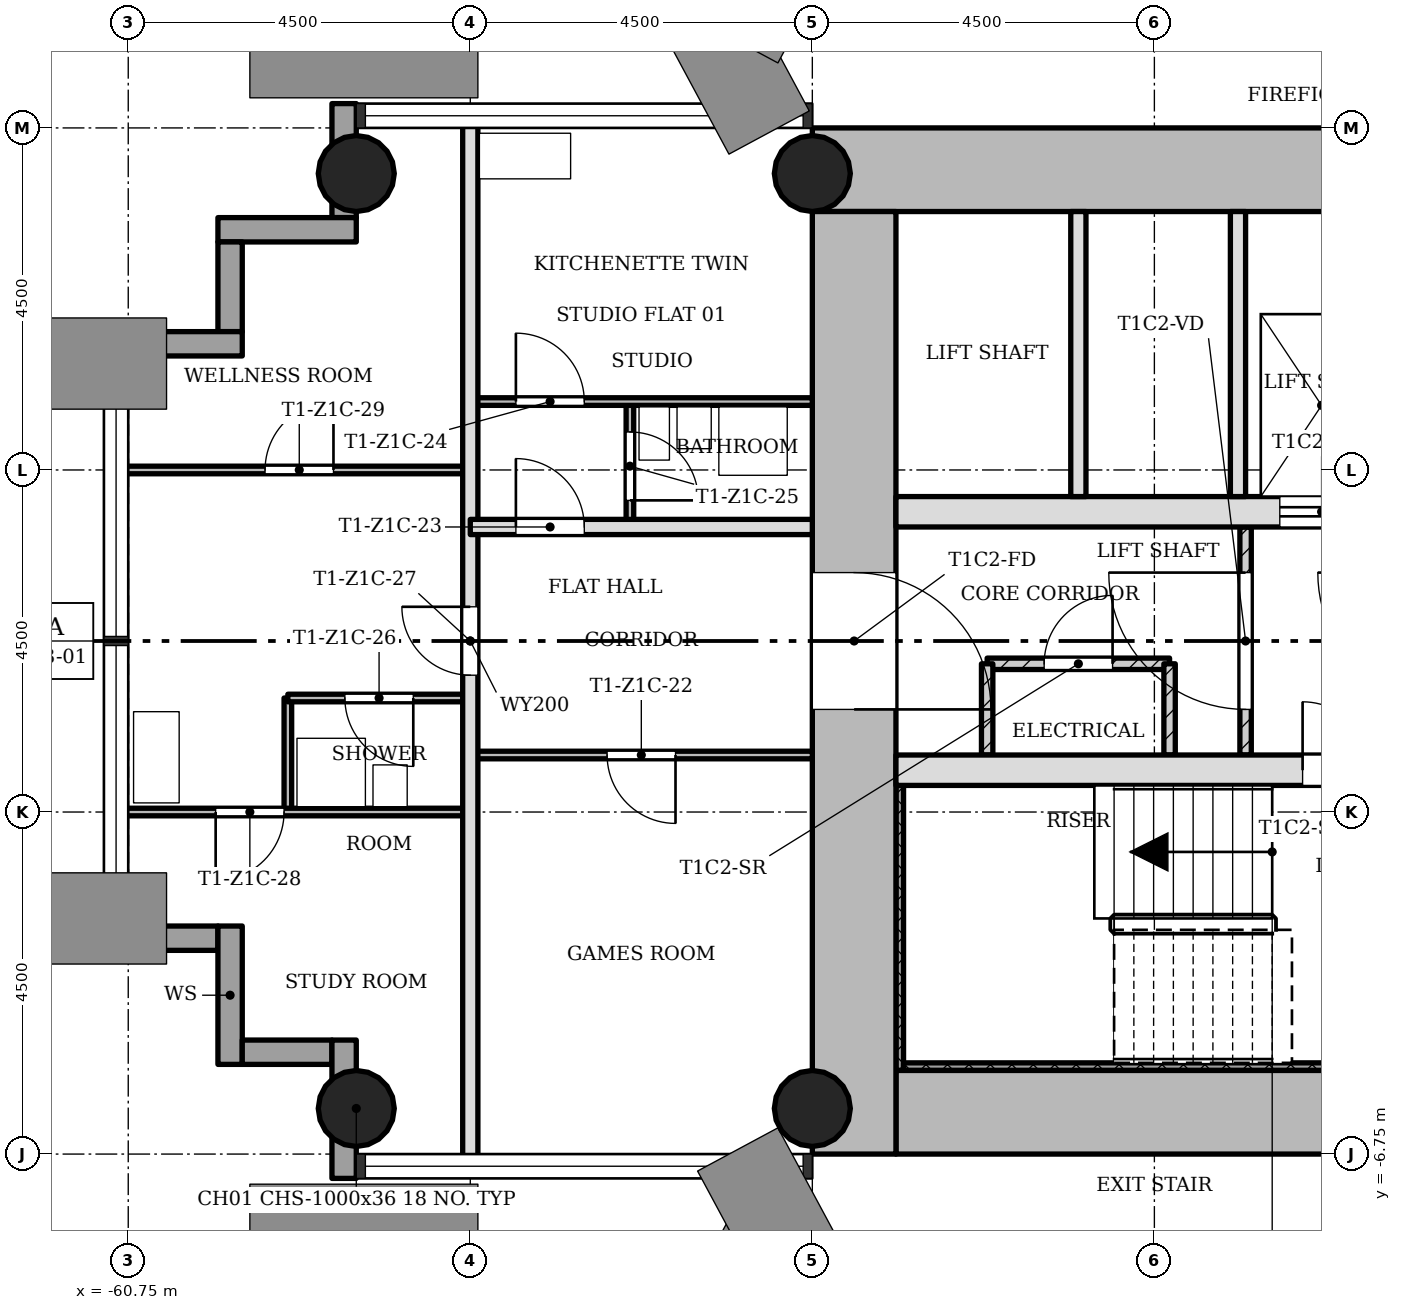
"""IFC4 building model, lengths in metres.
Left out: names, types, materials, properties, quantities, classifications, styles, units other than length and angle.
Written with IfcOpenShell. Run it as: python <this file> out.ifc"""

import sys

from ifc_helpers import new_model, si_unit, direction, frame, frame_2d, origin, origin_2d, place, context, subcontext, project, spatial, rectangle, hollow_circle, extrude, element, fill, save


model = new_model("IFC4")
c1 = context("Model", 3, precision=1e-05, world=origin(), true_north=direction((0.0, 1.0)))
c2 = subcontext(c1, "Body", "Model", "MODEL_VIEW")
j1 = project(units=[si_unit("LENGTHUNIT", "METRE"), si_unit("PLANEANGLEUNIT", "RADIAN")], contexts=[c1])
p1 = place(None, origin())
s1 = spatial("IfcSite", under=j1, at=p1, CompositionType="ELEMENT")
p2 = place(p1, origin())
s2 = spatial("IfcBuilding", under=s1, at=p2, CompositionType="ELEMENT")
p3 = place(p2, frame((0.0, 0.0, 51.7)))
s3 = spatial("IfcBuildingStorey", under=s2, at=p3, CompositionType="ELEMENT", Elevation=51.7)
p4 = place(p3, frame((-50.65, -6.2, 0.0), z_axis=(0.0, 0.0, 1.0), x_axis=(1.0, 0.0, 0.0)))
e1 = element("IfcWall", 1, at=p4, inside=s3, PredefinedType="SHEAR", context=c2, shape_type="SweptSolid", body=[
    extrude(rectangle(XDim=7.998, YDim=1.1, at=frame_2d((3.999, 0.0))), origin(), (0.0, 0.0, 1.0), 3.4),
])
p5 = place(p3, frame((-43.85, 6.2, 0.0), z_axis=(0.0, 0.0, 1.0), x_axis=(-1.0, 0.0, 0.0)))
e2 = element("IfcWall", 2, at=p5, inside=s3, PredefinedType="SHEAR", context=c2, shape_type="SweptSolid", body=[
    extrude(rectangle(XDim=7.9, YDim=1.1, at=frame_2d((3.95, 0.0))), origin(), (0.0, 0.0, 1.0), 3.4),
])
p6 = place(p3, frame((-51.2, 5.65, 0.0), z_axis=(0.0, 0.0, 1.0), x_axis=(0.0, -1.0, 0.0)))
e3 = element("IfcWall", 3, at=p6, inside=s3, PredefinedType="SHEAR", context=c2, shape_type="SweptSolid", body=[
    extrude(rectangle(XDim=12.4, YDim=1.1, at=frame_2d((6.2, 0.0))), origin(), (0.0, 0.0, 1.0), 3.4),
])
p7 = place(p6, frame((4.75, 0.0, 0.0)))
e4 = element("IfcOpeningElement", 4, at=p7, cuts=e3, PredefinedType="OPENING", context=c2, shape_type="SweptSolid", body=[
    extrude(rectangle(XDim=1.8, YDim=2.1, at=frame_2d((0.9, 1.05))), frame((0.0, 0.56, 0.0), z_axis=(0.0, -1.0, 0.0), x_axis=(1.0, 0.0, 0.0)), (0.0, 0.0, 1.0), 1.12),
])
p8 = place(p3, frame((-50.65, -1.7, 0.0), z_axis=(0.0, 0.0, 1.0), x_axis=(1.0, 0.0, 0.0)))
e5 = element("IfcWall", 5, at=p8, inside=s3, PredefinedType="SHEAR", context=c2, shape_type="SweptSolid", body=[
    extrude(rectangle(XDim=6.8, YDim=0.4, at=frame_2d((3.4, 0.0))), origin(), (0.0, 0.0, 1.0), 3.4),
])
p9 = place(p8, frame((5.35, 0.0, 0.0)))
e6 = element("IfcOpeningElement", 6, at=p9, cuts=e5, PredefinedType="OPENING", context=c2, shape_type="SweptSolid", body=[
    extrude(rectangle(XDim=0.9, YDim=2.1, at=frame_2d((0.45, 1.05))), frame((0.0, 0.21, 0.0), z_axis=(0.0, -1.0, 0.0), x_axis=(1.0, 0.0, 0.0)), (0.0, 0.0, 1.0), 0.42),
])
p10 = place(p3, frame((-50.65, 1.7, 0.0), z_axis=(0.0, 0.0, 1.0), x_axis=(1.0, 0.0, 0.0)))
e7 = element("IfcWall", 7, at=p10, inside=s3, PredefinedType="SHEAR", context=c2, shape_type="SweptSolid", body=[
    extrude(rectangle(XDim=6.8, YDim=0.4, at=frame_2d((3.4, 0.0))), origin(), (0.0, 0.0, 1.0), 3.4),
])
p11 = place(p10, frame((5.05, 0.0, 0.0)))
e8 = element("IfcOpeningElement", 8, at=p11, cuts=e7, PredefinedType="OPENING", context=c2, shape_type="SweptSolid", body=[
    extrude(rectangle(XDim=1.1, YDim=2.1, at=frame_2d((0.55, 1.05))), frame((0.0, 0.21, 0.0), z_axis=(0.0, -1.0, 0.0), x_axis=(1.0, 0.0, 0.0)), (0.0, 0.0, 1.0), 0.42),
])
for number, where, z_axis, x_axis in (
    (9, (-51.75, -6.15, 0.0), (0.0, 0.0, 1.0), (1.0, 0.0, 0.0)),
    (10, (-51.75, 6.15, 0.0), (0.0, 0.0, 1.0), (1.0, 0.0, 0.0)),
    (11, (-57.75, -6.15, 0.0), (0.0, 0.0, 1.0), (1.0, 0.0, 0.0)),
    (12, (-57.75, 6.15, 0.0), (0.0, 0.0, 1.0), (1.0, 0.0, 0.0)),
):
    element("IfcColumn", number, at=place(p3, frame(where, z_axis=z_axis, x_axis=x_axis)), inside=s3, PredefinedType="COLUMN", context=c2, shape_type="SweptSolid", body=[
        extrude(hollow_circle(Radius=0.5, WallThickness=0.036, at=origin_2d()), origin(), (0.0, 0.0, 1.0), 3.4),
    ])
p12 = place(p3, frame((-61.07, -3.91, -0.3), z_axis=(0.0, 0.0, 1.0), x_axis=(1.0, 0.0, 0.0)))
e13 = element("IfcWall", 13, at=p12, inside=s3, PredefinedType="STANDARD", context=c2, shape_type="SweptSolid", body=[
    extrude(rectangle(XDim=1.5, YDim=0.32, at=frame_2d((0.75, 0.0))), origin(), (0.0, 0.0, 1.0), 3.4),
])
p13 = place(p3, frame((-59.41, -3.75, -0.3), z_axis=(0.0, 0.0, 1.0), x_axis=(0.0, -1.0, 0.0)))
e14 = element("IfcWall", 14, at=p13, inside=s3, PredefinedType="STANDARD", context=c2, shape_type="SweptSolid", body=[
    extrude(rectangle(XDim=1.82, YDim=0.32, at=frame_2d((0.91, 0.0))), origin(), (0.0, 0.0, 1.0), 3.4),
])
p14 = place(p3, frame((-59.25, -5.41, -0.3), z_axis=(0.0, 0.0, 1.0), x_axis=(1.0, 0.0, 0.0)))
e15 = element("IfcWall", 15, at=p14, inside=s3, PredefinedType="STANDARD", context=c2, shape_type="SweptSolid", body=[
    extrude(rectangle(XDim=1.18, YDim=0.32, at=frame_2d((0.59, 0.0))), origin(), (0.0, 0.0, 1.0), 3.4),
])
p15 = place(p3, frame((-57.91, -5.25, -0.3), z_axis=(0.0, 0.0, 1.0), x_axis=(0.0, -1.0, 0.0)))
e16 = element("IfcWall", 16, at=p15, inside=s3, PredefinedType="STANDARD", context=c2, shape_type="SweptSolid", body=[
    extrude(rectangle(XDim=1.82, YDim=0.32, at=frame_2d((0.91, 0.0))), origin(), (0.0, 0.0, 1.0), 3.4),
])
p16 = place(p3, frame((-57.91, 7.07, -0.3), z_axis=(0.0, 0.0, 1.0), x_axis=(0.0, -1.0, 0.0)))
e17 = element("IfcWall", 17, at=p16, inside=s3, PredefinedType="STANDARD", context=c2, shape_type="SweptSolid", body=[
    extrude(rectangle(XDim=1.5, YDim=0.32, at=frame_2d((0.75, 0.0))), origin(), (0.0, 0.0, 1.0), 3.4),
])
p17 = place(p3, frame((-57.75, 5.41, -0.3), z_axis=(0.0, 0.0, 1.0), x_axis=(-1.0, 0.0, 0.0)))
e18 = element("IfcWall", 18, at=p17, inside=s3, PredefinedType="STANDARD", context=c2, shape_type="SweptSolid", body=[
    extrude(rectangle(XDim=1.82, YDim=0.32, at=frame_2d((0.91, 0.0))), origin(), (0.0, 0.0, 1.0), 3.4),
])
p18 = place(p3, frame((-59.41, 5.25, -0.3), z_axis=(0.0, 0.0, 1.0), x_axis=(0.0, -1.0, 0.0)))
e19 = element("IfcWall", 19, at=p18, inside=s3, PredefinedType="STANDARD", context=c2, shape_type="SweptSolid", body=[
    extrude(rectangle(XDim=1.18, YDim=0.32, at=frame_2d((0.59, 0.0))), origin(), (0.0, 0.0, 1.0), 3.4),
])
p19 = place(p3, frame((-59.25, 3.91, -0.3), z_axis=(0.0, 0.0, 1.0), x_axis=(-1.0, 0.0, 0.0)))
e20 = element("IfcWall", 20, at=p19, inside=s3, PredefinedType="STANDARD", context=c2, shape_type="SweptSolid", body=[
    extrude(rectangle(XDim=1.82, YDim=0.32, at=frame_2d((0.91, 0.0))), origin(), (0.0, 0.0, 1.0), 3.4),
])
p20 = place(p3, frame((-46.05, 1.5, 0.0), z_axis=(0.0, 0.0, 1.0), x_axis=(0.0, -1.0, 0.0)))
e21 = element("IfcWall", 21, at=p20, inside=s3, PredefinedType="PARTITIONING", context=c2, shape_type="SweptSolid", body=[
    extrude(rectangle(XDim=3.0, YDim=0.15, at=frame_2d((1.5, 0.0))), origin(), (0.0, 0.0, 1.0), 3.0),
])
p21 = place(p20, frame((0.6, 0.0, 0.0)))
e22 = element("IfcOpeningElement", 22, at=p21, cuts=e21, PredefinedType="OPENING", context=c2, shape_type="SweptSolid", body=[
    extrude(rectangle(XDim=1.8, YDim=2.1, at=frame_2d((0.9, 1.05))), frame((0.0, 0.085, 0.0), z_axis=(0.0, -1.0, 0.0), x_axis=(1.0, 0.0, 0.0)), (0.0, 0.0, 1.0), 0.17),
])
for number, where, z_axis, x_axis in (
    (23, (-46.15, 5.65, 0.0), (0.0, 0.0, 1.0), (0.0, -1.0, 0.0)),
    (24, (-48.25, 5.65, 0.0), (0.0, 0.0, 1.0), (0.0, -1.0, 0.0)),
):
    element("IfcWall", number, at=place(p3, frame(where, z_axis=z_axis, x_axis=x_axis)), inside=s3, PredefinedType="SOLIDWALL", context=c2, shape_type="SweptSolid", body=[
        extrude(rectangle(XDim=3.75, YDim=0.2, at=frame_2d((1.875, 0.0))), origin(), (0.0, 0.0, 1.0), 3.0),
    ])
p22 = place(p3, frame((-47.05, -0.3, 0.0), z_axis=(0.0, 0.0, 1.0), x_axis=(-1.0, 0.0, 0.0)))
e25 = element("IfcWall", 25, at=p22, inside=s3, PredefinedType="PARTITIONING", context=c2, shape_type="SweptSolid", body=[
    extrude(rectangle(XDim=2.4, YDim=0.15, at=frame_2d((1.2, 0.0))), origin(), (0.0, 0.0, 1.0), 3.0),
])
p23 = place(p22, frame((0.75, 0.0, 0.0)))
e26 = element("IfcOpeningElement", 26, at=p23, cuts=e25, PredefinedType="OPENING", context=c2, shape_type="SweptSolid", body=[
    extrude(rectangle(XDim=0.9, YDim=2.1, at=frame_2d((0.45, 1.05))), frame((0.0, 0.085, 0.0), z_axis=(0.0, -1.0, 0.0), x_axis=(1.0, 0.0, 0.0)), (0.0, 0.0, 1.0), 0.17),
])
for number, where, z_axis, x_axis in (
    (27, (-47.05, -0.3, 0.0), (0.0, 0.0, 1.0), (0.0, -1.0, 0.0)),
    (28, (-49.45, -0.3, 0.0), (0.0, 0.0, 1.0), (0.0, -1.0, 0.0)),
):
    element("IfcWall", number, at=place(p3, frame(where, z_axis=z_axis, x_axis=x_axis)), inside=s3, PredefinedType="PARTITIONING", context=c2, shape_type="SweptSolid", body=[
        extrude(rectangle(XDim=1.2, YDim=0.15, at=frame_2d((0.6, 0.0))), origin(), (0.0, 0.0, 1.0), 3.0),
    ])
p24 = place(p3, frame((-58.65, -2.25, 0.0), z_axis=(0.0, 0.0, 1.0), x_axis=(0.0, 1.0, 0.0)))
e29 = element("IfcWall", 29, at=p24, inside=s3, PredefinedType="PARTITIONING", context=c2, shape_type="SweptSolid", body=[
    extrude(rectangle(XDim=1.5, YDim=0.1, at=frame_2d((0.75, 0.0))), origin(), (0.0, 0.0, 1.0), 3.0),
])
p25 = place(p3, frame((-56.25, -6.85, 0.0), z_axis=(0.0, 0.0, 1.0), x_axis=(0.0, 1.0, 0.0)))
e30 = element("IfcWall", 30, at=p25, inside=s3, PredefinedType="SOLIDWALL", context=c2, shape_type="SweptSolid", body=[
    extrude(rectangle(XDim=13.7, YDim=0.2, at=frame_2d((6.85, 0.0))), origin(), (0.0, 0.0, 1.0), 3.0),
])
p26 = place(p25, frame((6.4, 0.0, 0.0)))
e31 = element("IfcOpeningElement", 31, at=p26, cuts=e30, PredefinedType="OPENING", context=c2, shape_type="SweptSolid", body=[
    extrude(rectangle(XDim=0.9, YDim=2.1, at=frame_2d((0.45, 1.05))), frame((0.0, 0.11, 0.0), z_axis=(0.0, -1.0, 0.0), x_axis=(1.0, 0.0, 0.0)), (0.0, 0.0, 1.0), 0.22),
])
p27 = place(p3, frame((-54.15, 1.5, 0.0), z_axis=(0.0, 0.0, 1.0), x_axis=(0.0, 1.0, 0.0)))
e32 = element("IfcWall", 32, at=p27, inside=s3, PredefinedType="PARTITIONING", context=c2, shape_type="SweptSolid", body=[
    extrude(rectangle(XDim=1.65, YDim=0.1, at=frame_2d((0.825, 0.0))), origin(), (0.0, 0.0, 1.0), 3.0),
])
p28 = place(p27, frame((0.35, 0.0, 0.0)))
e33 = element("IfcOpeningElement", 33, at=p28, cuts=e32, PredefinedType="OPENING", context=c2, shape_type="SweptSolid", body=[
    extrude(rectangle(XDim=0.9, YDim=2.1, at=frame_2d((0.45, 1.05))), frame((0.0, 0.06, 0.0), z_axis=(0.0, -1.0, 0.0), x_axis=(1.0, 0.0, 0.0)), (0.0, 0.0, 1.0), 0.12),
])
p29 = place(p3, frame((-60.85, -2.25, 0.0), z_axis=(0.0, 0.0, 1.0), x_axis=(1.0, 0.0, 0.0)))
e34 = element("IfcWall", 34, at=p29, inside=s3, PredefinedType="PARTITIONING", context=c2, shape_type="SweptSolid", body=[
    extrude(rectangle(XDim=4.6, YDim=0.1, at=frame_2d((2.3, 0.0))), origin(), (0.0, 0.0, 1.0), 3.0),
])
p30 = place(p29, frame((1.25, 0.0, 0.0)))
e35 = element("IfcOpeningElement", 35, at=p30, cuts=e34, PredefinedType="OPENING", context=c2, shape_type="SweptSolid", body=[
    extrude(rectangle(XDim=0.9, YDim=2.1, at=frame_2d((0.45, 1.05))), frame((0.0, 0.06, 0.0), z_axis=(0.0, -1.0, 0.0), x_axis=(1.0, 0.0, 0.0)), (0.0, 0.0, 1.0), 0.12),
])
p31 = place(p3, frame((-56.25, -1.5, 0.0), z_axis=(0.0, 0.0, 1.0), x_axis=(1.0, 0.0, 0.0)))
e36 = element("IfcWall", 36, at=p31, inside=s3, PredefinedType="PARTITIONING", context=c2, shape_type="SweptSolid", body=[
    extrude(rectangle(XDim=4.5, YDim=0.1, at=frame_2d((2.25, 0.0))), origin(), (0.0, 0.0, 1.0), 3.0),
])
p32 = place(p31, frame((1.8, 0.0, 0.0)))
e37 = element("IfcOpeningElement", 37, at=p32, cuts=e36, PredefinedType="OPENING", context=c2, shape_type="SweptSolid", body=[
    extrude(rectangle(XDim=0.9, YDim=2.1, at=frame_2d((0.45, 1.05))), frame((0.0, 0.06, 0.0), z_axis=(0.0, -1.0, 0.0), x_axis=(1.0, 0.0, 0.0)), (0.0, 0.0, 1.0), 0.12),
])
p33 = place(p3, frame((-58.65, -0.75, 0.0), z_axis=(0.0, 0.0, 1.0), x_axis=(1.0, 0.0, 0.0)))
e38 = element("IfcWall", 38, at=p33, inside=s3, PredefinedType="PARTITIONING", context=c2, shape_type="SweptSolid", body=[
    extrude(rectangle(XDim=2.4, YDim=0.1, at=frame_2d((1.2, 0.0))), origin(), (0.0, 0.0, 1.0), 3.0),
])
p34 = place(p33, frame((0.75, 0.0, 0.0)))
e39 = element("IfcOpeningElement", 39, at=p34, cuts=e38, PredefinedType="OPENING", context=c2, shape_type="SweptSolid", body=[
    extrude(rectangle(XDim=0.9, YDim=2.1, at=frame_2d((0.45, 1.05))), frame((0.0, 0.06, 0.0), z_axis=(0.0, -1.0, 0.0), x_axis=(1.0, 0.0, 0.0)), (0.0, 0.0, 1.0), 0.12),
])
p35 = place(p3, frame((-56.25, 1.5, 0.0), z_axis=(0.0, 0.0, 1.0), x_axis=(1.0, 0.0, 0.0)))
e40 = element("IfcWall", 40, at=p35, inside=s3, PredefinedType="SOLIDWALL", context=c2, shape_type="SweptSolid", body=[
    extrude(rectangle(XDim=4.5, YDim=0.2, at=frame_2d((2.25, 0.0))), origin(), (0.0, 0.0, 1.0), 3.0),
])
p36 = place(p35, frame((0.6, 0.0, 0.0)))
e41 = element("IfcOpeningElement", 41, at=p36, cuts=e40, PredefinedType="OPENING", context=c2, shape_type="SweptSolid", body=[
    extrude(rectangle(XDim=0.9, YDim=2.1, at=frame_2d((0.45, 1.05))), frame((0.0, 0.11, 0.0), z_axis=(0.0, -1.0, 0.0), x_axis=(1.0, 0.0, 0.0)), (0.0, 0.0, 1.0), 0.22),
])
p37 = place(p3, frame((-60.85, 2.25, 0.0), z_axis=(0.0, 0.0, 1.0), x_axis=(1.0, 0.0, 0.0)))
e42 = element("IfcWall", 42, at=p37, inside=s3, PredefinedType="PARTITIONING", context=c2, shape_type="SweptSolid", body=[
    extrude(rectangle(XDim=4.6, YDim=0.1, at=frame_2d((2.3, 0.0))), origin(), (0.0, 0.0, 1.0), 3.0),
])
p38 = place(p37, frame((1.9, 0.0, 0.0)))
e43 = element("IfcOpeningElement", 43, at=p38, cuts=e42, PredefinedType="OPENING", context=c2, shape_type="SweptSolid", body=[
    extrude(rectangle(XDim=0.9, YDim=2.1, at=frame_2d((0.45, 1.05))), frame((0.0, 0.06, 0.0), z_axis=(0.0, -1.0, 0.0), x_axis=(1.0, 0.0, 0.0)), (0.0, 0.0, 1.0), 0.12),
])
p39 = place(p3, frame((-56.25, 3.15, 0.0), z_axis=(0.0, 0.0, 1.0), x_axis=(1.0, 0.0, 0.0)))
e44 = element("IfcWall", 44, at=p39, inside=s3, PredefinedType="PARTITIONING", context=c2, shape_type="SweptSolid", body=[
    extrude(rectangle(XDim=4.5, YDim=0.1, at=frame_2d((2.25, 0.0))), origin(), (0.0, 0.0, 1.0), 3.0),
])
p40 = place(p39, frame((0.6, 0.0, 0.0)))
e45 = element("IfcOpeningElement", 45, at=p40, cuts=e44, PredefinedType="OPENING", context=c2, shape_type="SweptSolid", body=[
    extrude(rectangle(XDim=0.9, YDim=2.1, at=frame_2d((0.45, 1.05))), frame((0.0, 0.06, 0.0), z_axis=(0.0, -1.0, 0.0), x_axis=(1.0, 0.0, 0.0)), (0.0, 0.0, 1.0), 0.12),
])
p41 = place(p3, frame((-50.6, -1.9, 0.0), z_axis=(0.0, 0.0, 1.0), x_axis=(0.0, -1.0, 0.0)))
e46 = element("IfcWall", 46, at=p41, inside=s3, PredefinedType="SHEAR", context=c2, shape_type="SweptSolid", body=[
    extrude(rectangle(XDim=3.75, YDim=0.1, at=frame_2d((1.875, 0.0))), origin(), (0.0, 0.0, 1.0), 3.4),
])
p42 = place(p3, frame((-43.95, -5.6, 0.0), z_axis=(0.0, 0.0, 1.0), x_axis=(-1.0, 0.0, 0.0)))
e47 = element("IfcWall", 47, at=p42, inside=s3, PredefinedType="SHEAR", context=c2, shape_type="SweptSolid", body=[
    extrude(rectangle(XDim=6.6, YDim=0.1, at=frame_2d((3.3, 0.0))), origin(), (0.0, 0.0, 1.0), 3.4),
])
p43 = place(p21, origin())
e48 = element("IfcDoor", 48, at=p43, inside=s3, OperationType="SINGLE_SWING_LEFT", PredefinedType="DOOR", context=c2, shape_type="SweptSolid", body=[
    extrude(rectangle(XDim=1.8, YDim=2.1, at=frame_2d((0.9, 1.05))), frame((0.0, 0.025, 0.0), z_axis=(0.0, -1.0, 0.0), x_axis=(1.0, 0.0, 0.0)), (0.0, 0.0, 1.0), 0.05),
])
fill(e22, e48)
p44 = place(p23, origin())
e49 = element("IfcDoor", 49, at=p44, inside=s3, OperationType="SINGLE_SWING_LEFT", PredefinedType="DOOR", context=c2, shape_type="SweptSolid", body=[
    extrude(rectangle(XDim=0.9, YDim=2.1, at=frame_2d((0.45, 1.05))), frame((0.0, 0.025, 0.0), z_axis=(0.0, -1.0, 0.0), x_axis=(1.0, 0.0, 0.0)), (0.0, 0.0, 1.0), 0.05),
])
fill(e26, e49)
p45 = place(p32, origin())
e50 = element("IfcDoor", 50, at=p45, inside=s3, OperationType="SINGLE_SWING_RIGHT", PredefinedType="DOOR", context=c2, shape_type="SweptSolid", body=[
    extrude(rectangle(XDim=0.9, YDim=2.1, at=frame_2d((0.45, 1.05))), frame((0.0, 0.025, 0.0), z_axis=(0.0, -1.0, 0.0), x_axis=(1.0, 0.0, 0.0)), (0.0, 0.0, 1.0), 0.05),
])
fill(e37, e50)
p46 = place(p36, origin())
e51 = element("IfcDoor", 51, at=p46, inside=s3, OperationType="SINGLE_SWING_RIGHT", PredefinedType="DOOR", context=c2, shape_type="SweptSolid", body=[
    extrude(rectangle(XDim=0.9, YDim=2.1, at=frame_2d((0.45, 1.05))), frame((0.0, 0.025, 0.0), z_axis=(0.0, -1.0, 0.0), x_axis=(1.0, 0.0, 0.0)), (0.0, 0.0, 1.0), 0.05),
])
fill(e41, e51)
p47 = place(p40, origin())
e52 = element("IfcDoor", 52, at=p47, inside=s3, OperationType="SINGLE_SWING_RIGHT", PredefinedType="DOOR", context=c2, shape_type="SweptSolid", body=[
    extrude(rectangle(XDim=0.9, YDim=2.1, at=frame_2d((0.45, 1.05))), frame((0.0, 0.025, 0.0), z_axis=(0.0, -1.0, 0.0), x_axis=(1.0, 0.0, 0.0)), (0.0, 0.0, 1.0), 0.05),
])
fill(e45, e52)
p48 = place(p28, origin())
e53 = element("IfcDoor", 53, at=p48, inside=s3, OperationType="SINGLE_SWING_LEFT", PredefinedType="DOOR", context=c2, shape_type="SweptSolid", body=[
    extrude(rectangle(XDim=0.9, YDim=2.1, at=frame_2d((0.45, 1.05))), frame((0.0, 0.025, 0.0), z_axis=(0.0, -1.0, 0.0), x_axis=(1.0, 0.0, 0.0)), (0.0, 0.0, 1.0), 0.05),
])
fill(e33, e53)
p49 = place(p34, origin())
e54 = element("IfcDoor", 54, at=p49, inside=s3, OperationType="SINGLE_SWING_RIGHT", PredefinedType="DOOR", context=c2, shape_type="SweptSolid", body=[
    extrude(rectangle(XDim=0.9, YDim=2.1, at=frame_2d((0.45, 1.05))), frame((0.0, 0.025, 0.0), z_axis=(0.0, -1.0, 0.0), x_axis=(1.0, 0.0, 0.0)), (0.0, 0.0, 1.0), 0.05),
])
fill(e39, e54)
p50 = place(p26, origin())
e55 = element("IfcDoor", 55, at=p50, inside=s3, OperationType="SINGLE_SWING_LEFT", PredefinedType="DOOR", context=c2, shape_type="SweptSolid", body=[
    extrude(rectangle(XDim=0.9, YDim=2.1, at=frame_2d((0.45, 1.05))), frame((0.0, 0.025, 0.0), z_axis=(0.0, -1.0, 0.0), x_axis=(1.0, 0.0, 0.0)), (0.0, 0.0, 1.0), 0.05),
])
fill(e31, e55)
p51 = place(p30, origin())
e56 = element("IfcDoor", 56, at=p51, inside=s3, OperationType="SINGLE_SWING_LEFT", PredefinedType="DOOR", context=c2, shape_type="SweptSolid", body=[
    extrude(rectangle(XDim=0.9, YDim=2.1, at=frame_2d((0.45, 1.05))), frame((0.0, 0.025, 0.0), z_axis=(0.0, -1.0, 0.0), x_axis=(1.0, 0.0, 0.0)), (0.0, 0.0, 1.0), 0.05),
])
fill(e35, e56)
p52 = place(p38, origin())
e57 = element("IfcDoor", 57, at=p52, inside=s3, OperationType="SINGLE_SWING_LEFT", PredefinedType="DOOR", context=c2, shape_type="SweptSolid", body=[
    extrude(rectangle(XDim=0.9, YDim=2.1, at=frame_2d((0.45, 1.05))), frame((0.0, 0.025, 0.0), z_axis=(0.0, -1.0, 0.0), x_axis=(1.0, 0.0, 0.0)), (0.0, 0.0, 1.0), 0.05),
])
fill(e43, e57)
p53 = place(p9, origin())
e58 = element("IfcDoor", 58, at=p53, inside=s3, OperationType="SINGLE_SWING_RIGHT", PredefinedType="DOOR", context=c2, shape_type="SweptSolid", body=[
    extrude(rectangle(XDim=0.9, YDim=2.1, at=frame_2d((0.45, 1.05))), frame((0.0, 0.025, 0.0), z_axis=(0.0, -1.0, 0.0), x_axis=(1.0, 0.0, 0.0)), (0.0, 0.0, 1.0), 0.05),
])
fill(e6, e58)
p54 = place(p11, origin())
e59 = element("IfcDoor", 59, at=p54, inside=s3, OperationType="SLIDING_TO_LEFT", PredefinedType="DOOR", context=c2, shape_type="SweptSolid", body=[
    extrude(rectangle(XDim=1.1, YDim=2.1, at=frame_2d((0.55, 1.05))), frame((0.0, 0.025, 0.0), z_axis=(0.0, -1.0, 0.0), x_axis=(1.0, 0.0, 0.0)), (0.0, 0.0, 1.0), 0.05),
])
fill(e8, e59)
p55 = place(p7, origin())
e60 = element("IfcDoor", 60, at=p55, inside=s3, OperationType="SINGLE_SWING_LEFT", PredefinedType="DOOR", context=c2, shape_type="SweptSolid", body=[
    extrude(rectangle(XDim=1.8, YDim=2.1, at=frame_2d((0.9, 1.05))), frame((0.0, 0.025, 0.0), z_axis=(0.0, -1.0, 0.0), x_axis=(1.0, 0.0, 0.0)), (0.0, 0.0, 1.0), 0.05),
])
fill(e4, e60)
save(model, sys.argv[1])
